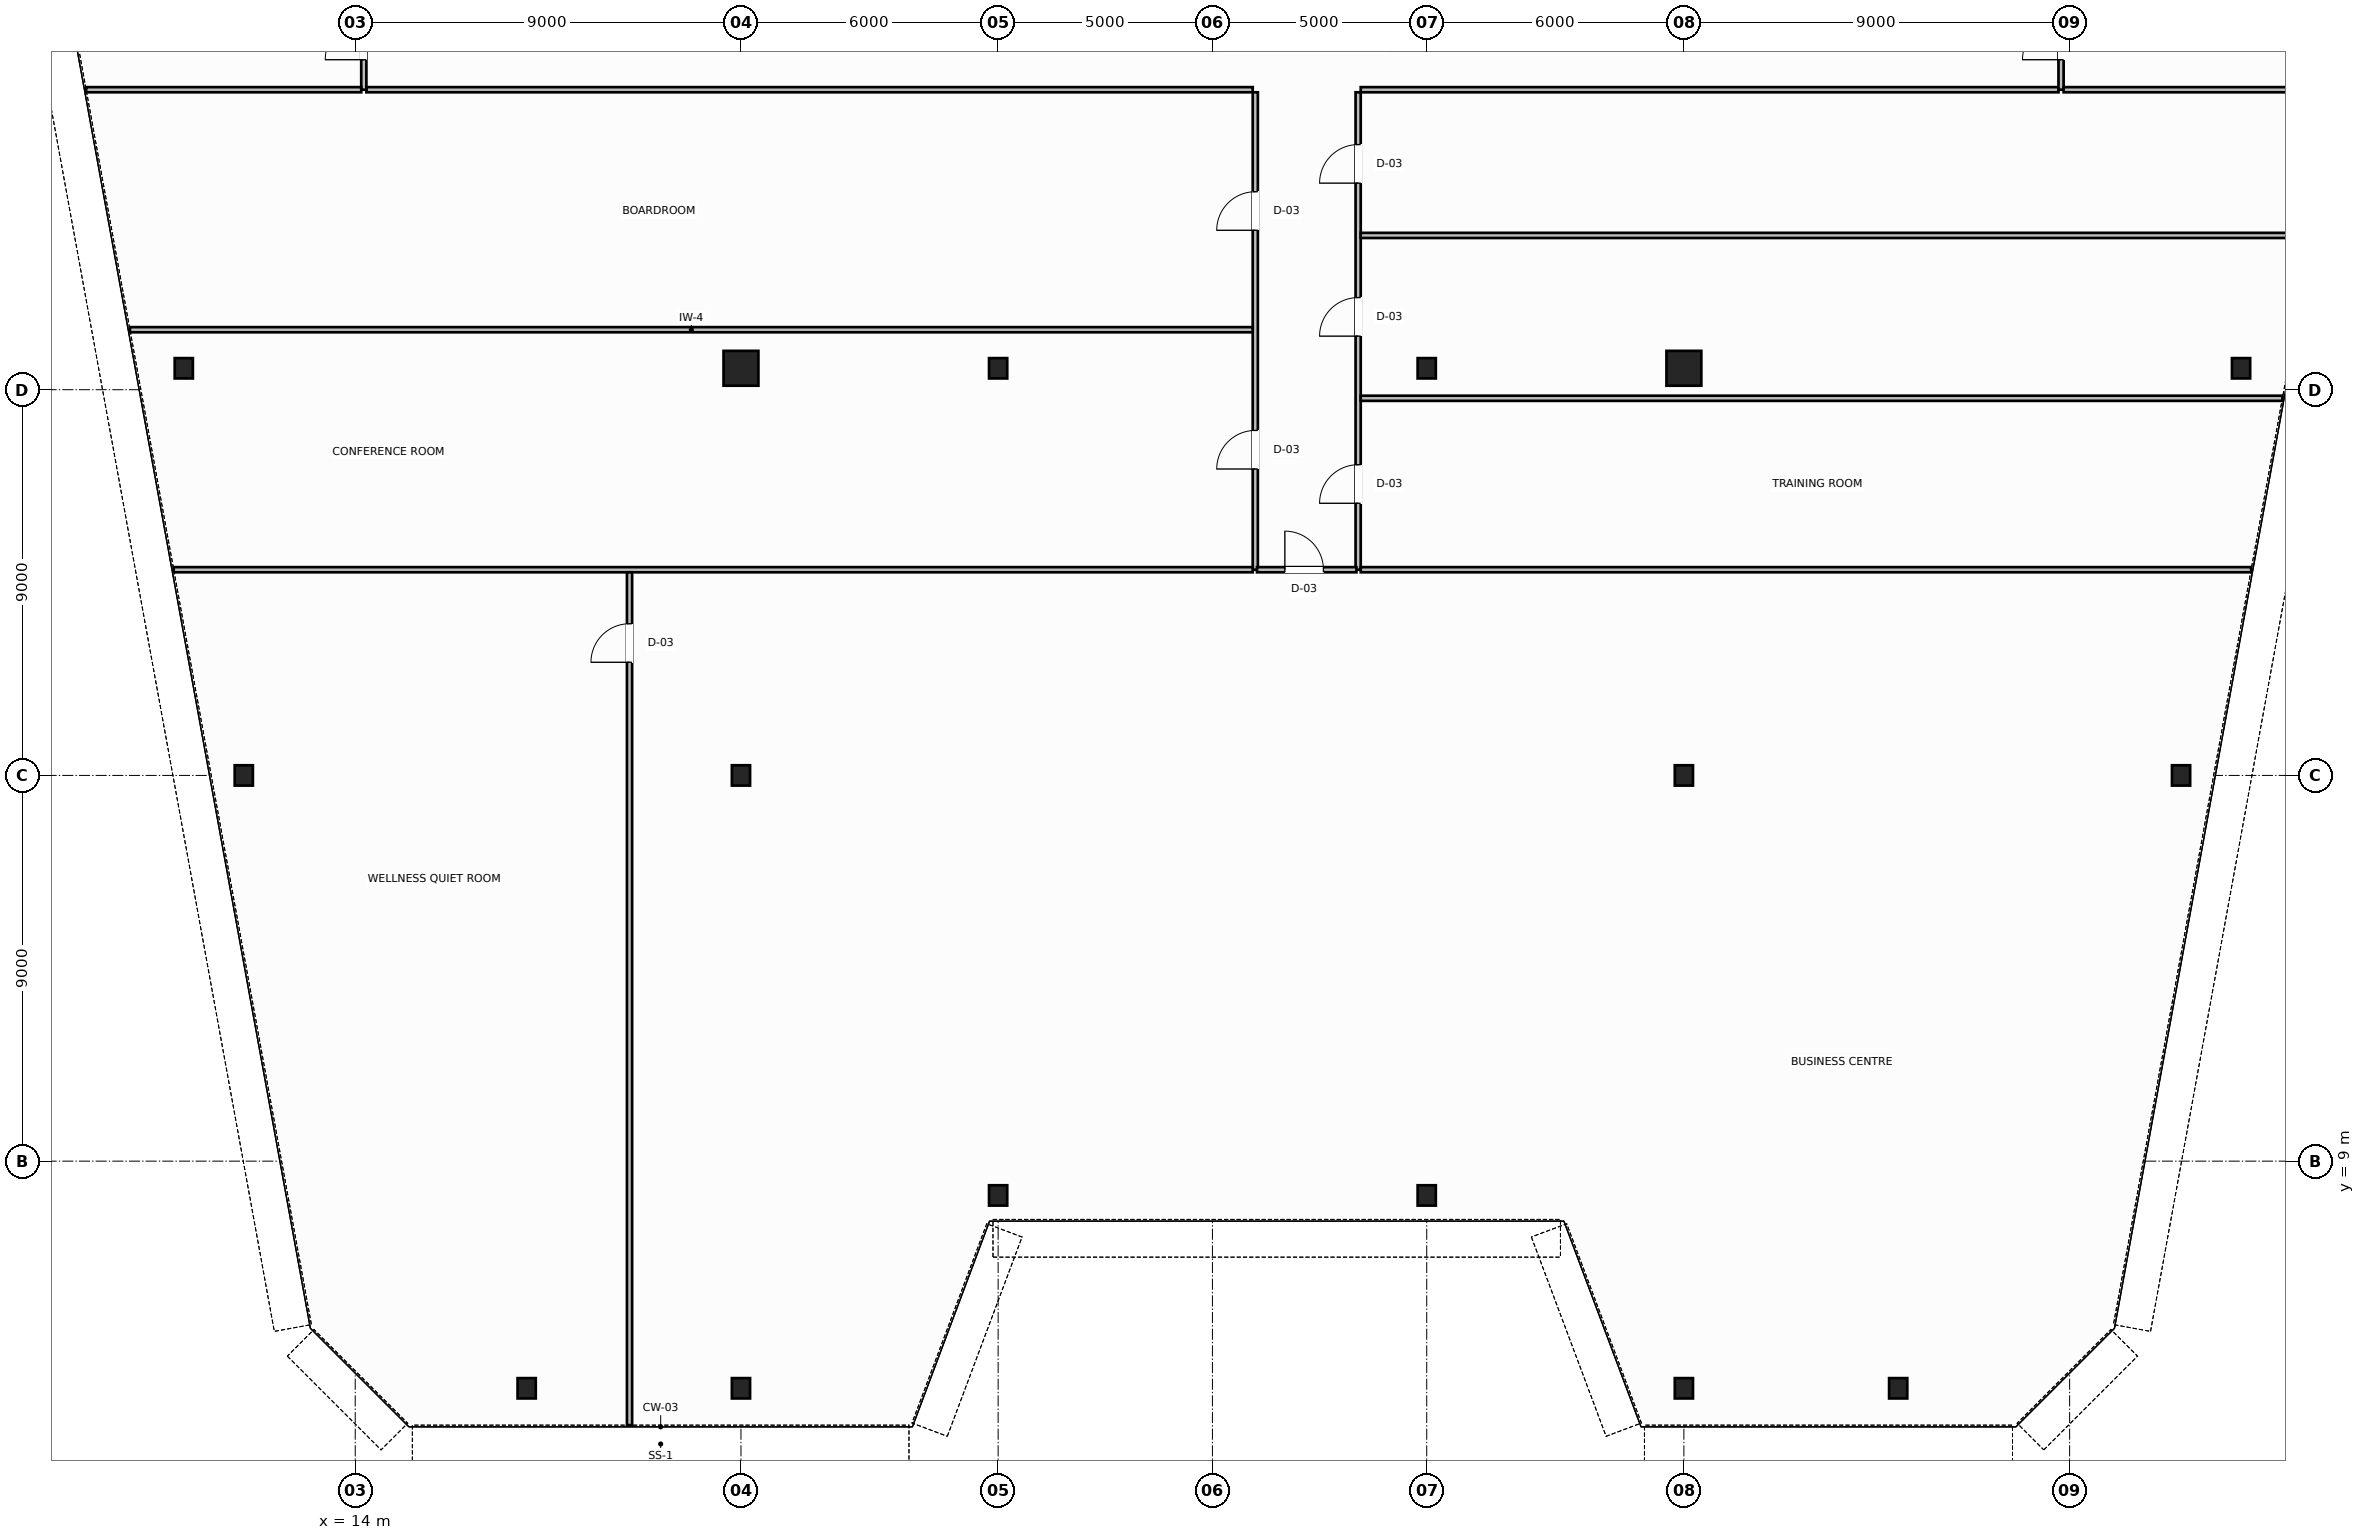
"""IFC4 building model, lengths in metres.
Left out: names, types, materials, properties, quantities, classifications, styles, units other than length and angle.
Written with IfcOpenShell. Run it as: python <this file> out.ifc"""

import sys

from ifc_helpers import new_model, si_unit, direction, frame, frame_2d, origin, origin_2d, place, context, subcontext, project, spatial, rectangle, hollow_circle, i_section, extrude, source, transform, mapped, element, fill, save


model = new_model("IFC4")
c1 = context("Model", 3, precision=1e-05, world=origin(), true_north=direction((0.0, 1.0)))
c2 = subcontext(c1, "Body", "Model", "MODEL_VIEW")
j1 = project(units=[si_unit("LENGTHUNIT", "METRE"), si_unit("PLANEANGLEUNIT", "RADIAN")], contexts=[c1])
p1 = place(None, origin())
s1 = spatial("IfcSite", under=j1, at=p1, CompositionType="ELEMENT")
p2 = place(p1, origin())
s2 = spatial("IfcBuilding", under=s1, at=p2, CompositionType="ELEMENT")
p3 = place(p2, frame((0.0, 0.0, 157.6)))
s3 = spatial("IfcBuildingStorey", under=s2, at=p3, CompositionType="ELEMENT", Elevation=157.6)
m1 = source(origin(), c2, "Body", "SweptSolid", [
    extrude(i_section(OverallWidth=0.424, OverallDepth=0.474, WebThickness=0.047, FlangeThickness=0.065, FilletRadius=0.015, at=origin_2d()), origin(), (0.0, 0.0, 1.0), 3.8),
])
for number, where, z_axis, x_axis in (
    (1, (10.0, 27.5, 0.0), (0.0, 0.0, 1.0), (1.0, 0.0, 0.0)),
    (2, (11.4, 18.0, 0.0), (0.0, 0.0, 1.0), (1.0, 0.0, 0.0)),
    (3, (58.0, 27.5, 0.0), (0.0, 0.0, 1.0), (1.0, 0.0, 0.0)),
    (4, (56.6, 18.0, 0.0), (0.0, 0.0, 1.0), (1.0, 0.0, 0.0)),
):
    element("IfcColumn", number, at=place(p3, frame(where, z_axis=z_axis, x_axis=x_axis)), inside=s3, PredefinedType="COLUMN", context=c2, shape_type="MappedRepresentation", body=[
        mapped(m1, transform((0.0, 0.0, 0.0), scale=1.0)),
    ])
m2 = source(origin(), c2, "Body", "SweptSolid", [
    extrude(hollow_circle(Radius=0.406, WallThickness=0.04, at=origin_2d()), origin(), (0.0, 0.0, 1.0), 3.8),
])
p4 = place(p3, frame((23.0, 27.5, 0.0), z_axis=(0.0, 0.0, 1.0), x_axis=(1.0, 0.0, 0.0)))
e5 = element("IfcColumn", 5, at=p4, inside=s3, PredefinedType="COLUMN", context=c2, shape_type="MappedRepresentation", body=[
    mapped(m2, transform((0.0, 0.0, 0.0), scale=1.0)),
])
m3 = source(origin(), c2, "Body", "SweptSolid", [
    extrude(i_section(OverallWidth=0.424, OverallDepth=0.474, WebThickness=0.047, FlangeThickness=0.065, FilletRadius=0.015, at=origin_2d()), origin(), (0.0, 0.0, 1.0), 3.8),
])
for number, where, z_axis, x_axis in (
    (6, (29.0, 27.5, 0.0), (0.0, 0.0, 1.0), (1.0, 0.0, 0.0)),
    (7, (39.0, 27.5, 0.0), (0.0, 0.0, 1.0), (1.0, 0.0, 0.0)),
):
    element("IfcColumn", number, at=place(p3, frame(where, z_axis=z_axis, x_axis=x_axis)), inside=s3, PredefinedType="COLUMN", context=c2, shape_type="MappedRepresentation", body=[
        mapped(m3, transform((0.0, 0.0, 0.0), scale=1.0)),
    ])
p5 = place(p3, frame((45.0, 27.5, 0.0), z_axis=(0.0, 0.0, 1.0), x_axis=(1.0, 0.0, 0.0)))
e8 = element("IfcColumn", 8, at=p5, inside=s3, PredefinedType="COLUMN", context=c2, shape_type="MappedRepresentation", body=[
    mapped(m2, transform((0.0, 0.0, 0.0), scale=1.0)),
])
for number, where, z_axis, x_axis in (
    (9, (23.0, 18.0, 0.0), (0.0, 0.0, 1.0), (1.0, 0.0, 0.0)),
    (10, (45.0, 18.0, 0.0), (0.0, 0.0, 1.0), (1.0, 0.0, 0.0)),
    (11, (18.0, 3.7, 0.0), (0.0, 0.0, 1.0), (1.0, 0.0, 0.0)),
    (12, (23.0, 3.7, 0.0), (0.0, 0.0, 1.0), (1.0, 0.0, 0.0)),
    (13, (29.0, 8.2, 0.0), (0.0, 0.0, 1.0), (1.0, 0.0, 0.0)),
    (14, (39.0, 8.2, 0.0), (0.0, 0.0, 1.0), (1.0, 0.0, 0.0)),
    (15, (45.0, 3.7, 0.0), (0.0, 0.0, 1.0), (1.0, 0.0, 0.0)),
    (16, (50.0, 3.7, 0.0), (0.0, 0.0, 1.0), (1.0, 0.0, 0.0)),
):
    element("IfcColumn", number, at=place(p3, frame(where, z_axis=z_axis, x_axis=x_axis)), inside=s3, PredefinedType="COLUMN", context=c2, shape_type="MappedRepresentation", body=[
        mapped(m3, transform((0.0, 0.0, 0.0), scale=1.0)),
    ])
p6 = place(p3, frame((14.26, 34.0, 0.0), z_axis=(0.0, 0.0, 1.0), x_axis=(1.0, 0.0, 0.0)))
e17 = element("IfcWall", 17, at=p6, inside=s3, PredefinedType="PARTITIONING", context=c2, shape_type="SweptSolid", body=[
    extrude(rectangle(XDim=20.68, YDim=0.12, at=frame_2d((10.34, 0.0))), origin(), (0.0, 0.0, 1.0), 3.58),
])
p7 = place(p3, frame((37.46, 34.0, 0.0), z_axis=(0.0, 0.0, 1.0), x_axis=(1.0, 0.0, 0.0)))
e18 = element("IfcWall", 18, at=p7, inside=s3, PredefinedType="PARTITIONING", context=c2, shape_type="SweptSolid", body=[
    extrude(rectangle(XDim=16.28, YDim=0.12, at=frame_2d((8.14, 0.0))), origin(), (0.0, 0.0, 1.0), 3.58),
])
p8 = place(p3, frame((14.2, 34.0, 0.0), z_axis=(0.0, 0.0, 1.0), x_axis=(0.0, 1.0, 0.0)))
e19 = element("IfcWall", 19, at=p8, inside=s3, PredefinedType="PARTITIONING", context=c2, shape_type="SweptSolid", body=[
    extrude(rectangle(XDim=2.44, YDim=0.12, at=frame_2d((1.22, 0.0))), origin(), (0.0, 0.0, 1.0), 3.58),
])
p9 = place(p8, frame((0.7, 0.0, 0.0)))
e20 = element("IfcOpeningElement", 20, at=p9, cuts=e19, PredefinedType="OPENING", context=c2, shape_type="SweptSolid", body=[
    extrude(rectangle(XDim=0.9, YDim=2.15, at=frame_2d((0.45, 1.075))), frame((0.0, 0.07, 0.0), z_axis=(0.0, -1.0, 0.0), x_axis=(1.0, 0.0, 0.0)), (0.0, 0.0, 1.0), 0.14),
])
p10 = place(p3, frame((53.8, 34.0, 0.0), z_axis=(0.0, 0.0, 1.0), x_axis=(0.0, 1.0, 0.0)))
e21 = element("IfcWall", 21, at=p10, inside=s3, PredefinedType="PARTITIONING", context=c2, shape_type="SweptSolid", body=[
    extrude(rectangle(XDim=2.44, YDim=0.12, at=frame_2d((1.22, 0.0))), origin(), (0.0, 0.0, 1.0), 3.58),
])
p11 = place(p10, frame((0.7, 0.0, 0.0)))
e22 = element("IfcOpeningElement", 22, at=p11, cuts=e21, PredefinedType="OPENING", context=c2, shape_type="SweptSolid", body=[
    extrude(rectangle(XDim=0.9, YDim=2.15, at=frame_2d((0.45, 1.075))), frame((0.0, 0.07, 0.0), z_axis=(0.0, -1.0, 0.0), x_axis=(1.0, 0.0, 0.0)), (0.0, 0.0, 1.0), 0.14),
])
p12 = place(p3, frame((35.0, 22.8, 0.0), z_axis=(0.0, 0.0, 1.0), x_axis=(0.0, 1.0, 0.0)))
e23 = element("IfcWall", 23, at=p12, inside=s3, PredefinedType="PARTITIONING", context=c2, shape_type="SweptSolid", body=[
    extrude(rectangle(XDim=11.14, YDim=0.12, at=frame_2d((5.57, 0.0))), origin(), (0.0, 0.0, 1.0), 3.58),
])
p13 = place(p12, frame((2.35, 0.0, 0.0)))
e24 = element("IfcOpeningElement", 24, at=p13, cuts=e23, PredefinedType="OPENING", context=c2, shape_type="SweptSolid", body=[
    extrude(rectangle(XDim=0.9, YDim=2.15, at=frame_2d((0.45, 1.075))), frame((0.0, 0.07, 0.0), z_axis=(0.0, -1.0, 0.0), x_axis=(1.0, 0.0, 0.0)), (0.0, 0.0, 1.0), 0.14),
])
p14 = place(p12, frame((7.92, 0.0, 0.0)))
e25 = element("IfcOpeningElement", 25, at=p14, cuts=e23, PredefinedType="OPENING", context=c2, shape_type="SweptSolid", body=[
    extrude(rectangle(XDim=0.9, YDim=2.15, at=frame_2d((0.45, 1.075))), frame((0.0, 0.07, 0.0), z_axis=(0.0, -1.0, 0.0), x_axis=(1.0, 0.0, 0.0)), (0.0, 0.0, 1.0), 0.14),
])
p15 = place(p3, frame((37.4, 22.8, 0.0), z_axis=(0.0, 0.0, 1.0), x_axis=(0.0, 1.0, 0.0)))
e26 = element("IfcWall", 26, at=p15, inside=s3, PredefinedType="PARTITIONING", context=c2, shape_type="SweptSolid", body=[
    extrude(rectangle(XDim=11.14, YDim=0.12, at=frame_2d((5.57, 0.0))), origin(), (0.0, 0.0, 1.0), 3.58),
])
p16 = place(p15, frame((1.55, 0.0, 0.0)))
e27 = element("IfcOpeningElement", 27, at=p16, cuts=e26, PredefinedType="OPENING", context=c2, shape_type="SweptSolid", body=[
    extrude(rectangle(XDim=0.9, YDim=2.15, at=frame_2d((0.45, 1.075))), frame((0.0, 0.07, 0.0), z_axis=(0.0, -1.0, 0.0), x_axis=(1.0, 0.0, 0.0)), (0.0, 0.0, 1.0), 0.14),
])
p17 = place(p15, frame((5.45, 0.0, 0.0)))
e28 = element("IfcOpeningElement", 28, at=p17, cuts=e26, PredefinedType="OPENING", context=c2, shape_type="SweptSolid", body=[
    extrude(rectangle(XDim=0.9, YDim=2.15, at=frame_2d((0.45, 1.075))), frame((0.0, 0.07, 0.0), z_axis=(0.0, -1.0, 0.0), x_axis=(1.0, 0.0, 0.0)), (0.0, 0.0, 1.0), 0.14),
])
p18 = place(p15, frame((9.02, 0.0, 0.0)))
e29 = element("IfcOpeningElement", 29, at=p18, cuts=e26, PredefinedType="OPENING", context=c2, shape_type="SweptSolid", body=[
    extrude(rectangle(XDim=0.9, YDim=2.15, at=frame_2d((0.45, 1.075))), frame((0.0, 0.07, 0.0), z_axis=(0.0, -1.0, 0.0), x_axis=(1.0, 0.0, 0.0)), (0.0, 0.0, 1.0), 0.14),
])
p19 = place(p3, frame((35.04, 22.8, 0.0), z_axis=(0.0, 0.0, 1.0), x_axis=(1.0, 0.0, 0.0)))
e30 = element("IfcWall", 30, at=p19, inside=s3, PredefinedType="PARTITIONING", context=c2, shape_type="SweptSolid", body=[
    extrude(rectangle(XDim=2.32, YDim=0.12, at=frame_2d((1.16, 0.0))), origin(), (0.0, 0.0, 1.0), 3.58),
])
p20 = place(p19, frame((0.65, 0.0, 0.0)))
e31 = element("IfcOpeningElement", 31, at=p20, cuts=e30, PredefinedType="OPENING", context=c2, shape_type="SweptSolid", body=[
    extrude(rectangle(XDim=0.9, YDim=2.15, at=frame_2d((0.45, 1.075))), frame((0.0, 0.07, 0.0), z_axis=(0.0, -1.0, 0.0), x_axis=(1.0, 0.0, 0.0)), (0.0, 0.0, 1.0), 0.14),
])
for number, where, z_axis, x_axis in (
    (32, (7.721, 34.0, 0.0), (0.0, 0.0, 1.0), (1.0, 0.0, 0.0)),
    (33, (53.86, 34.0, 0.0), (0.0, 0.0, 1.0), (1.0, 0.0, 0.0)),
):
    element("IfcWall", number, at=place(p3, frame(where, z_axis=z_axis, x_axis=x_axis)), inside=s3, PredefinedType="PARTITIONING", context=c2, shape_type="SweptSolid", body=[
        extrude(rectangle(XDim=6.418, YDim=0.12, at=frame_2d((3.209, 0.0))), origin(), (0.0, 0.0, 1.0), 3.58),
    ])
p21 = place(p3, frame((8.743, 28.4, 0.0), z_axis=(0.0, 0.0, 1.0), x_axis=(1.0, 0.0, 0.0)))
e34 = element("IfcWall", 34, at=p21, inside=s3, PredefinedType="PARTITIONING", context=c2, shape_type="SweptSolid", body=[
    extrude(rectangle(XDim=26.197, YDim=0.12, at=frame_2d((13.099, 0.0))), origin(), (0.0, 0.0, 1.0), 3.58),
])
p22 = place(p3, frame((37.46, 26.8, 0.0), z_axis=(0.0, 0.0, 1.0), x_axis=(1.0, 0.0, 0.0)))
e35 = element("IfcWall", 35, at=p22, inside=s3, PredefinedType="PARTITIONING", context=c2, shape_type="SweptSolid", body=[
    extrude(rectangle(XDim=21.505, YDim=0.12, at=frame_2d((10.753, 0.0))), origin(), (0.0, 0.0, 1.0), 3.58),
])
p23 = place(p3, frame((37.46, 30.6, 0.0), z_axis=(0.0, 0.0, 1.0), x_axis=(1.0, 0.0, 0.0)))
e36 = element("IfcWall", 36, at=p23, inside=s3, PredefinedType="PARTITIONING", context=c2, shape_type="SweptSolid", body=[
    extrude(rectangle(XDim=22.198, YDim=0.12, at=frame_2d((11.099, 0.0))), origin(), (0.0, 0.0, 1.0), 3.12),
])
p24 = place(p3, frame((9.764, 22.8, 0.0), z_axis=(0.0, 0.0, 1.0), x_axis=(1.0, 0.0, 0.0)))
e37 = element("IfcWall", 37, at=p24, inside=s3, PredefinedType="PARTITIONING", context=c2, shape_type="SweptSolid", body=[
    extrude(rectangle(XDim=25.176, YDim=0.12, at=frame_2d((12.588, 0.0))), origin(), (0.0, 0.0, 1.0), 3.58),
])
p25 = place(p3, frame((37.46, 22.8, 0.0), z_axis=(0.0, 0.0, 1.0), x_axis=(1.0, 0.0, 0.0)))
e38 = element("IfcWall", 38, at=p25, inside=s3, PredefinedType="PARTITIONING", context=c2, shape_type="SweptSolid", body=[
    extrude(rectangle(XDim=20.776, YDim=0.12, at=frame_2d((10.388, 0.0))), origin(), (0.0, 0.0, 1.0), 3.58),
])
p26 = place(p3, frame((20.4, 2.84, 0.0), z_axis=(0.0, 0.0, 1.0), x_axis=(0.0, 1.0, 0.0)))
e39 = element("IfcWall", 39, at=p26, inside=s3, PredefinedType="PARTITIONING", context=c2, shape_type="SweptSolid", body=[
    extrude(rectangle(XDim=19.9, YDim=0.12, at=frame_2d((9.95, 0.0))), origin(), (0.0, 0.0, 1.0), 3.58),
])
p27 = place(p26, frame((17.8, 0.0, 0.0)))
e40 = element("IfcOpeningElement", 40, at=p27, cuts=e39, PredefinedType="OPENING", context=c2, shape_type="SweptSolid", body=[
    extrude(rectangle(XDim=0.9, YDim=2.15, at=frame_2d((0.45, 1.075))), frame((0.0, 0.07, 0.0), z_axis=(0.0, -1.0, 0.0), x_axis=(1.0, 0.0, 0.0)), (0.0, 0.0, 1.0), 0.14),
])
m4 = source(origin(), c2, "Body", "SweptSolid", [
    extrude(rectangle(XDim=0.9, YDim=2.15, at=frame_2d((0.45, 1.075))), frame((0.0, 0.025, 0.0), z_axis=(0.0, -1.0, 0.0), x_axis=(1.0, 0.0, 0.0)), (0.0, 0.0, 1.0), 0.05),
])
p28 = place(p9, origin())
e41 = element("IfcDoor", 41, at=p28, inside=s3, OperationType="SINGLE_SWING_LEFT", PredefinedType="DOOR", context=c2, shape_type="MappedRepresentation", body=[
    mapped(m4, transform((0.0, 0.0, 0.0), scale=1.0)),
])
fill(e20, e41)
p29 = place(p11, origin())
e42 = element("IfcDoor", 42, at=p29, inside=s3, OperationType="SINGLE_SWING_RIGHT", PredefinedType="DOOR", context=c2, shape_type="MappedRepresentation", body=[
    mapped(m4, transform((0.0, 0.0, 0.0), scale=1.0)),
])
fill(e22, e42)
p30 = place(p13, origin())
e43 = element("IfcDoor", 43, at=p30, inside=s3, OperationType="SINGLE_SWING_LEFT", PredefinedType="DOOR", context=c2, shape_type="MappedRepresentation", body=[
    mapped(m4, transform((0.0, 0.0, 0.0), scale=1.0)),
])
fill(e24, e43)
p31 = place(p14, origin())
e44 = element("IfcDoor", 44, at=p31, inside=s3, OperationType="SINGLE_SWING_RIGHT", PredefinedType="DOOR", context=c2, shape_type="MappedRepresentation", body=[
    mapped(m4, transform((0.0, 0.0, 0.0), scale=1.0)),
])
fill(e25, e44)
p32 = place(p16, origin())
e45 = element("IfcDoor", 45, at=p32, inside=s3, OperationType="SINGLE_SWING_RIGHT", PredefinedType="DOOR", context=c2, shape_type="MappedRepresentation", body=[
    mapped(m4, transform((0.0, 0.0, 0.0), scale=1.0)),
])
fill(e27, e45)
p33 = place(p17, origin())
e46 = element("IfcDoor", 46, at=p33, inside=s3, OperationType="SINGLE_SWING_LEFT", PredefinedType="DOOR", context=c2, shape_type="MappedRepresentation", body=[
    mapped(m4, transform((0.0, 0.0, 0.0), scale=1.0)),
])
fill(e28, e46)
p34 = place(p18, origin())
e47 = element("IfcDoor", 47, at=p34, inside=s3, OperationType="SINGLE_SWING_RIGHT", PredefinedType="DOOR", context=c2, shape_type="MappedRepresentation", body=[
    mapped(m4, transform((0.0, 0.0, 0.0), scale=1.0)),
])
fill(e29, e47)
p35 = place(p27, origin())
e48 = element("IfcDoor", 48, at=p35, inside=s3, OperationType="SINGLE_SWING_RIGHT", PredefinedType="DOOR", context=c2, shape_type="MappedRepresentation", body=[
    mapped(m4, transform((0.0, 0.0, 0.0), scale=1.0)),
])
fill(e40, e48)
p36 = place(p20, origin())
e49 = element("IfcDoor", 49, at=p36, inside=s3, OperationType="SINGLE_SWING_LEFT", PredefinedType="DOOR", context=c2, shape_type="MappedRepresentation", body=[
    mapped(m4, transform((0.0, 0.0, 0.0), scale=1.0)),
])
fill(e31, e49)
save(model, sys.argv[1])
